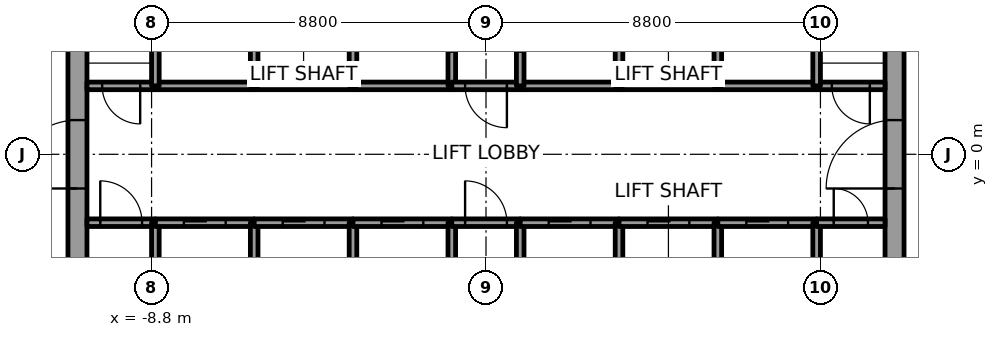
"""IFC4 building model, lengths in metres.
Left out: names, types, materials, properties, quantities, classifications, styles, units other than length and angle.
Written with IfcOpenShell. Run it as: python <this file> out.ifc"""

import sys

from ifc_helpers import new_model, si_unit, direction, frame, frame_2d, origin, place, context, subcontext, project, spatial, rectangle, extrude, element, fill, save


model = new_model("IFC4")
c1 = context("Model", 3, precision=1e-05, world=origin(), true_north=direction((0.0, 1.0)))
c2 = subcontext(c1, "Body", "Model", "MODEL_VIEW")
j1 = project(units=[si_unit("LENGTHUNIT", "METRE"), si_unit("PLANEANGLEUNIT", "RADIAN")], contexts=[c1])
p1 = place(None, origin())
s1 = spatial("IfcSite", under=j1, at=p1, CompositionType="ELEMENT")
p2 = place(p1, origin())
s2 = spatial("IfcBuilding", under=s1, at=p2, CompositionType="ELEMENT")
p3 = place(p2, frame((0.0, 0.0, 185.8)))
s3 = spatial("IfcBuildingStorey", under=s2, at=p3, CompositionType="ELEMENT", Elevation=185.8)
p4 = place(p3, frame((-10.75, -7.5, 0.0), z_axis=(0.0, 0.0, 1.0), x_axis=(0.0, 1.0, 0.0)))
e1 = element("IfcWall", 1, at=p4, inside=s3, PredefinedType="SHEAR", context=c2, shape_type="SweptSolid", body=[
    extrude(rectangle(XDim=15.0, YDim=0.5, at=frame_2d((7.5, 0.0))), origin(), (0.0, 0.0, 1.0), 4.0),
])
p5 = place(p4, frame((6.6, 0.0, 0.0)))
e2 = element("IfcOpeningElement", 2, at=p5, cuts=e1, PredefinedType="OPENING", context=c2, shape_type="SweptSolid", body=[
    extrude(rectangle(XDim=1.8, YDim=2.1, at=frame_2d((0.9, 1.05))), frame((0.0, 0.25, 0.0), z_axis=(0.0, -1.0, 0.0), x_axis=(1.0, 0.0, 0.0)), (0.0, 0.0, 1.0), 0.5),
])
p6 = place(p3, frame((10.75, -7.5, 0.0), z_axis=(0.0, 0.0, 1.0), x_axis=(0.0, 1.0, 0.0)))
e3 = element("IfcWall", 3, at=p6, inside=s3, PredefinedType="SHEAR", context=c2, shape_type="SweptSolid", body=[
    extrude(rectangle(XDim=15.0, YDim=0.5, at=frame_2d((7.5, 0.0))), origin(), (0.0, 0.0, 1.0), 4.0),
])
p7 = place(p6, frame((6.6, 0.0, 0.0)))
e4 = element("IfcOpeningElement", 4, at=p7, cuts=e3, PredefinedType="OPENING", context=c2, shape_type="SweptSolid", body=[
    extrude(rectangle(XDim=1.8, YDim=2.1, at=frame_2d((0.9, 1.05))), frame((0.0, 0.25, 0.0), z_axis=(0.0, -1.0, 0.0), x_axis=(1.0, 0.0, 0.0)), (0.0, 0.0, 1.0), 0.5),
])
p8 = place(p3, frame((-10.5, -1.8, 0.0), z_axis=(0.0, 0.0, 1.0), x_axis=(1.0, 0.0, 0.0)))
e5 = element("IfcWall", 5, at=p8, inside=s3, PredefinedType="SOLIDWALL", context=c2, shape_type="SweptSolid", body=[
    extrude(rectangle(XDim=1.8, YDim=0.2, at=frame_2d((0.9, 0.0))), origin(), (0.0, 0.0, 1.0), 3.85),
])
p9 = place(p8, frame((0.35, 0.0, 0.0)))
e6 = element("IfcOpeningElement", 6, at=p9, cuts=e5, PredefinedType="OPENING", context=c2, shape_type="SweptSolid", body=[
    extrude(rectangle(XDim=1.1, YDim=2.1, at=frame_2d((0.55, 1.05))), frame((0.0, 0.1, 0.0), z_axis=(0.0, -1.0, 0.0), x_axis=(1.0, 0.0, 0.0)), (0.0, 0.0, 1.0), 0.2),
])
p10 = place(p3, frame((-8.7, 1.8, 0.0), z_axis=(0.0, 0.0, 1.0), x_axis=(-1.0, 0.0, 0.0)))
e7 = element("IfcWall", 7, at=p10, inside=s3, PredefinedType="SOLIDWALL", context=c2, shape_type="SweptSolid", body=[
    extrude(rectangle(XDim=1.8, YDim=0.2, at=frame_2d((0.9, 0.0))), origin(), (0.0, 0.0, 1.0), 3.85),
])
p11 = place(p10, frame((0.4, 0.0, 0.0)))
e8 = element("IfcOpeningElement", 8, at=p11, cuts=e7, PredefinedType="OPENING", context=c2, shape_type="SweptSolid", body=[
    extrude(rectangle(XDim=1.0, YDim=2.1, at=frame_2d((0.5, 1.05))), frame((0.0, 0.1, 0.0), z_axis=(0.0, -1.0, 0.0), x_axis=(1.0, 0.0, 0.0)), (0.0, 0.0, 1.0), 0.2),
])
p12 = place(p3, frame((-8.7, -4.6, 0.0), z_axis=(0.0, 0.0, 1.0), x_axis=(0.0, 1.0, 0.0)))
e9 = element("IfcWall", 9, at=p12, inside=s3, PredefinedType="SOLIDWALL", context=c2, shape_type="SweptSolid", body=[
    extrude(rectangle(XDim=2.8, YDim=0.2, at=frame_2d((1.4, 0.0))), origin(), (0.0, 0.0, 1.0), 3.85),
])
p13 = place(p3, frame((-8.7, -1.8, 0.0), z_axis=(0.0, 0.0, 1.0), x_axis=(1.0, 0.0, 0.0)))
e10 = element("IfcWall", 10, at=p13, inside=s3, PredefinedType="SOLIDWALL", context=c2, shape_type="SweptSolid", body=[
    extrude(rectangle(XDim=2.6, YDim=0.2, at=frame_2d((1.3, 0.0))), origin(), (0.0, 0.0, 1.0), 3.85),
])
p14 = place(p13, frame((0.75, 0.0, 0.0)))
e11 = element("IfcOpeningElement", 11, at=p14, cuts=e10, PredefinedType="OPENING", context=c2, shape_type="SweptSolid", body=[
    extrude(rectangle(XDim=1.1, YDim=2.1, at=frame_2d((0.55, 1.05))), frame((0.0, 0.1, 0.0), z_axis=(0.0, -1.0, 0.0), x_axis=(1.0, 0.0, 0.0)), (0.0, 0.0, 1.0), 0.2),
])
p15 = place(p3, frame((-6.1, 1.8, 0.0), z_axis=(0.0, 0.0, 1.0), x_axis=(-1.0, 0.0, 0.0)))
e12 = element("IfcWall", 12, at=p15, inside=s3, PredefinedType="SOLIDWALL", context=c2, shape_type="SweptSolid", body=[
    extrude(rectangle(XDim=2.6, YDim=0.2, at=frame_2d((1.3, 0.0))), origin(), (0.0, 0.0, 1.0), 3.85),
])
for number, where, z_axis, x_axis in (
    (13, (-8.7, 1.8, 0.0), (0.0, 0.0, 1.0), (0.0, 1.0, 0.0)),
    (14, (-6.1, -4.6, 0.0), (0.0, 0.0, 1.0), (0.0, 1.0, 0.0)),
):
    element("IfcWall", number, at=place(p3, frame(where, z_axis=z_axis, x_axis=x_axis)), inside=s3, PredefinedType="SOLIDWALL", context=c2, shape_type="SweptSolid", body=[
        extrude(rectangle(XDim=2.8, YDim=0.2, at=frame_2d((1.4, 0.0))), origin(), (0.0, 0.0, 1.0), 3.85),
    ])
p16 = place(p3, frame((-6.1, -1.8, 0.0), z_axis=(0.0, 0.0, 1.0), x_axis=(1.0, 0.0, 0.0)))
e15 = element("IfcWall", 15, at=p16, inside=s3, PredefinedType="SOLIDWALL", context=c2, shape_type="SweptSolid", body=[
    extrude(rectangle(XDim=2.6, YDim=0.2, at=frame_2d((1.3, 0.0))), origin(), (0.0, 0.0, 1.0), 3.85),
])
p17 = place(p16, frame((0.75, 0.0, 0.0)))
e16 = element("IfcOpeningElement", 16, at=p17, cuts=e15, PredefinedType="OPENING", context=c2, shape_type="SweptSolid", body=[
    extrude(rectangle(XDim=1.1, YDim=2.1, at=frame_2d((0.55, 1.05))), frame((0.0, 0.1, 0.0), z_axis=(0.0, -1.0, 0.0), x_axis=(1.0, 0.0, 0.0)), (0.0, 0.0, 1.0), 0.2),
])
p18 = place(p3, frame((-3.5, 1.8, 0.0), z_axis=(0.0, 0.0, 1.0), x_axis=(-1.0, 0.0, 0.0)))
e17 = element("IfcWall", 17, at=p18, inside=s3, PredefinedType="SOLIDWALL", context=c2, shape_type="SweptSolid", body=[
    extrude(rectangle(XDim=2.6, YDim=0.2, at=frame_2d((1.3, 0.0))), origin(), (0.0, 0.0, 1.0), 3.85),
])
for number, where, z_axis, x_axis in (
    (18, (-6.1, 1.8, 0.0), (0.0, 0.0, 1.0), (0.0, 1.0, 0.0)),
    (19, (-3.5, -4.6, 0.0), (0.0, 0.0, 1.0), (0.0, 1.0, 0.0)),
):
    element("IfcWall", number, at=place(p3, frame(where, z_axis=z_axis, x_axis=x_axis)), inside=s3, PredefinedType="SOLIDWALL", context=c2, shape_type="SweptSolid", body=[
        extrude(rectangle(XDim=2.8, YDim=0.2, at=frame_2d((1.4, 0.0))), origin(), (0.0, 0.0, 1.0), 3.85),
    ])
p19 = place(p3, frame((-3.5, -1.8, 0.0), z_axis=(0.0, 0.0, 1.0), x_axis=(1.0, 0.0, 0.0)))
e20 = element("IfcWall", 20, at=p19, inside=s3, PredefinedType="SOLIDWALL", context=c2, shape_type="SweptSolid", body=[
    extrude(rectangle(XDim=2.6, YDim=0.2, at=frame_2d((1.3, 0.0))), origin(), (0.0, 0.0, 1.0), 3.85),
])
p20 = place(p19, frame((0.75, 0.0, 0.0)))
e21 = element("IfcOpeningElement", 21, at=p20, cuts=e20, PredefinedType="OPENING", context=c2, shape_type="SweptSolid", body=[
    extrude(rectangle(XDim=1.1, YDim=2.1, at=frame_2d((0.55, 1.05))), frame((0.0, 0.1, 0.0), z_axis=(0.0, -1.0, 0.0), x_axis=(1.0, 0.0, 0.0)), (0.0, 0.0, 1.0), 0.2),
])
p21 = place(p3, frame((-0.9, 1.8, 0.0), z_axis=(0.0, 0.0, 1.0), x_axis=(-1.0, 0.0, 0.0)))
e22 = element("IfcWall", 22, at=p21, inside=s3, PredefinedType="SOLIDWALL", context=c2, shape_type="SweptSolid", body=[
    extrude(rectangle(XDim=2.6, YDim=0.2, at=frame_2d((1.3, 0.0))), origin(), (0.0, 0.0, 1.0), 3.85),
])
p22 = place(p3, frame((-3.5, 4.6, 0.0), z_axis=(0.0, 0.0, 1.0), x_axis=(0.0, -1.0, 0.0)))
e23 = element("IfcWall", 23, at=p22, inside=s3, PredefinedType="SOLIDWALL", context=c2, shape_type="SweptSolid", body=[
    extrude(rectangle(XDim=2.8, YDim=0.2, at=frame_2d((1.4, 0.0))), origin(), (0.0, 0.0, 1.0), 3.85),
])
p23 = place(p3, frame((-0.9, 1.8, 0.0), z_axis=(0.0, 0.0, 1.0), x_axis=(0.0, 1.0, 0.0)))
e24 = element("IfcWall", 24, at=p23, inside=s3, PredefinedType="SOLIDWALL", context=c2, shape_type="SweptSolid", body=[
    extrude(rectangle(XDim=3.0, YDim=0.2, at=frame_2d((1.5, 0.0))), origin(), (0.0, 0.0, 1.0), 3.85),
])
p24 = place(p23, frame((0.9, 0.0, 0.0)))
e25 = element("IfcOpeningElement", 25, at=p24, cuts=e24, PredefinedType="OPENING", context=c2, shape_type="SweptSolid", body=[
    extrude(rectangle(XDim=1.2, YDim=2.1, at=frame_2d((0.6, 1.05))), frame((0.0, 0.1, 0.0), z_axis=(0.0, -1.0, 0.0), x_axis=(1.0, 0.0, 0.0)), (0.0, 0.0, 1.0), 0.2),
])
p25 = place(p3, frame((-0.9, -4.6, 0.0), z_axis=(0.0, 0.0, 1.0), x_axis=(0.0, 1.0, 0.0)))
e26 = element("IfcWall", 26, at=p25, inside=s3, PredefinedType="SOLIDWALL", context=c2, shape_type="SweptSolid", body=[
    extrude(rectangle(XDim=2.8, YDim=0.2, at=frame_2d((1.4, 0.0))), origin(), (0.0, 0.0, 1.0), 3.85),
])
p26 = place(p3, frame((-0.9, -1.8, 0.0), z_axis=(0.0, 0.0, 1.0), x_axis=(1.0, 0.0, 0.0)))
e27 = element("IfcWall", 27, at=p26, inside=s3, PredefinedType="SOLIDWALL", context=c2, shape_type="SweptSolid", body=[
    extrude(rectangle(XDim=1.8, YDim=0.2, at=frame_2d((0.9, 0.0))), origin(), (0.0, 0.0, 1.0), 3.85),
])
p27 = place(p26, frame((0.35, 0.0, 0.0)))
e28 = element("IfcOpeningElement", 28, at=p27, cuts=e27, PredefinedType="OPENING", context=c2, shape_type="SweptSolid", body=[
    extrude(rectangle(XDim=1.1, YDim=2.1, at=frame_2d((0.55, 1.05))), frame((0.0, 0.1, 0.0), z_axis=(0.0, -1.0, 0.0), x_axis=(1.0, 0.0, 0.0)), (0.0, 0.0, 1.0), 0.2),
])
p28 = place(p3, frame((0.9, 1.8, 0.0), z_axis=(0.0, 0.0, 1.0), x_axis=(-1.0, 0.0, 0.0)))
e29 = element("IfcWall", 29, at=p28, inside=s3, PredefinedType="SOLIDWALL", context=c2, shape_type="SweptSolid", body=[
    extrude(rectangle(XDim=1.8, YDim=0.2, at=frame_2d((0.9, 0.0))), origin(), (0.0, 0.0, 1.0), 3.85),
])
p29 = place(p28, frame((0.35, 0.0, 0.0)))
e30 = element("IfcOpeningElement", 30, at=p29, cuts=e29, PredefinedType="OPENING", context=c2, shape_type="SweptSolid", body=[
    extrude(rectangle(XDim=1.1, YDim=2.1, at=frame_2d((0.55, 1.05))), frame((0.0, 0.1, 0.0), z_axis=(0.0, -1.0, 0.0), x_axis=(1.0, 0.0, 0.0)), (0.0, 0.0, 1.0), 0.2),
])
p30 = place(p3, frame((0.9, -1.8, 0.0), z_axis=(0.0, 0.0, 1.0), x_axis=(0.0, -1.0, 0.0)))
e31 = element("IfcWall", 31, at=p30, inside=s3, PredefinedType="SOLIDWALL", context=c2, shape_type="SweptSolid", body=[
    extrude(rectangle(XDim=2.8, YDim=0.2, at=frame_2d((1.4, 0.0))), origin(), (0.0, 0.0, 1.0), 3.85),
])
p31 = place(p3, frame((0.9, -1.8, 0.0), z_axis=(0.0, 0.0, 1.0), x_axis=(1.0, 0.0, 0.0)))
e32 = element("IfcWall", 32, at=p31, inside=s3, PredefinedType="SOLIDWALL", context=c2, shape_type="SweptSolid", body=[
    extrude(rectangle(XDim=2.6, YDim=0.2, at=frame_2d((1.3, 0.0))), origin(), (0.0, 0.0, 1.0), 3.85),
])
p32 = place(p31, frame((0.75, 0.0, 0.0)))
e33 = element("IfcOpeningElement", 33, at=p32, cuts=e32, PredefinedType="OPENING", context=c2, shape_type="SweptSolid", body=[
    extrude(rectangle(XDim=1.1, YDim=2.1, at=frame_2d((0.55, 1.05))), frame((0.0, 0.1, 0.0), z_axis=(0.0, -1.0, 0.0), x_axis=(1.0, 0.0, 0.0)), (0.0, 0.0, 1.0), 0.2),
])
p33 = place(p3, frame((3.5, 1.8, 0.0), z_axis=(0.0, 0.0, 1.0), x_axis=(-1.0, 0.0, 0.0)))
e34 = element("IfcWall", 34, at=p33, inside=s3, PredefinedType="SOLIDWALL", context=c2, shape_type="SweptSolid", body=[
    extrude(rectangle(XDim=2.6, YDim=0.2, at=frame_2d((1.3, 0.0))), origin(), (0.0, 0.0, 1.0), 3.85),
])
p34 = place(p3, frame((0.9, 4.8, 0.0), z_axis=(0.0, 0.0, 1.0), x_axis=(0.0, -1.0, 0.0)))
e35 = element("IfcWall", 35, at=p34, inside=s3, PredefinedType="SOLIDWALL", context=c2, shape_type="SweptSolid", body=[
    extrude(rectangle(XDim=3.0, YDim=0.2, at=frame_2d((1.5, 0.0))), origin(), (0.0, 0.0, 1.0), 3.85),
])
p35 = place(p34, frame((0.9, 0.0, 0.0)))
e36 = element("IfcOpeningElement", 36, at=p35, cuts=e35, PredefinedType="OPENING", context=c2, shape_type="SweptSolid", body=[
    extrude(rectangle(XDim=1.2, YDim=2.1, at=frame_2d((0.6, 1.05))), frame((0.0, 0.1, 0.0), z_axis=(0.0, -1.0, 0.0), x_axis=(1.0, 0.0, 0.0)), (0.0, 0.0, 1.0), 0.2),
])
p36 = place(p3, frame((3.5, -4.6, 0.0), z_axis=(0.0, 0.0, 1.0), x_axis=(0.0, 1.0, 0.0)))
e37 = element("IfcWall", 37, at=p36, inside=s3, PredefinedType="SOLIDWALL", context=c2, shape_type="SweptSolid", body=[
    extrude(rectangle(XDim=2.8, YDim=0.2, at=frame_2d((1.4, 0.0))), origin(), (0.0, 0.0, 1.0), 3.85),
])
p37 = place(p3, frame((3.5, -1.8, 0.0), z_axis=(0.0, 0.0, 1.0), x_axis=(1.0, 0.0, 0.0)))
e38 = element("IfcWall", 38, at=p37, inside=s3, PredefinedType="SOLIDWALL", context=c2, shape_type="SweptSolid", body=[
    extrude(rectangle(XDim=2.6, YDim=0.2, at=frame_2d((1.3, 0.0))), origin(), (0.0, 0.0, 1.0), 3.85),
])
p38 = place(p37, frame((0.75, 0.0, 0.0)))
e39 = element("IfcOpeningElement", 39, at=p38, cuts=e38, PredefinedType="OPENING", context=c2, shape_type="SweptSolid", body=[
    extrude(rectangle(XDim=1.1, YDim=2.1, at=frame_2d((0.55, 1.05))), frame((0.0, 0.1, 0.0), z_axis=(0.0, -1.0, 0.0), x_axis=(1.0, 0.0, 0.0)), (0.0, 0.0, 1.0), 0.2),
])
p39 = place(p3, frame((6.1, 1.8, 0.0), z_axis=(0.0, 0.0, 1.0), x_axis=(-1.0, 0.0, 0.0)))
e40 = element("IfcWall", 40, at=p39, inside=s3, PredefinedType="SOLIDWALL", context=c2, shape_type="SweptSolid", body=[
    extrude(rectangle(XDim=2.6, YDim=0.2, at=frame_2d((1.3, 0.0))), origin(), (0.0, 0.0, 1.0), 3.85),
])
for number, where, z_axis, x_axis in (
    (41, (3.5, 1.8, 0.0), (0.0, 0.0, 1.0), (0.0, 1.0, 0.0)),
    (42, (6.1, -4.6, 0.0), (0.0, 0.0, 1.0), (0.0, 1.0, 0.0)),
):
    element("IfcWall", number, at=place(p3, frame(where, z_axis=z_axis, x_axis=x_axis)), inside=s3, PredefinedType="SOLIDWALL", context=c2, shape_type="SweptSolid", body=[
        extrude(rectangle(XDim=2.8, YDim=0.2, at=frame_2d((1.4, 0.0))), origin(), (0.0, 0.0, 1.0), 3.85),
    ])
p40 = place(p3, frame((6.1, -1.8, 0.0), z_axis=(0.0, 0.0, 1.0), x_axis=(1.0, 0.0, 0.0)))
e43 = element("IfcWall", 43, at=p40, inside=s3, PredefinedType="SOLIDWALL", context=c2, shape_type="SweptSolid", body=[
    extrude(rectangle(XDim=2.6, YDim=0.2, at=frame_2d((1.3, 0.0))), origin(), (0.0, 0.0, 1.0), 3.85),
])
p41 = place(p40, frame((0.75, 0.0, 0.0)))
e44 = element("IfcOpeningElement", 44, at=p41, cuts=e43, PredefinedType="OPENING", context=c2, shape_type="SweptSolid", body=[
    extrude(rectangle(XDim=1.1, YDim=2.1, at=frame_2d((0.55, 1.05))), frame((0.0, 0.1, 0.0), z_axis=(0.0, -1.0, 0.0), x_axis=(1.0, 0.0, 0.0)), (0.0, 0.0, 1.0), 0.2),
])
p42 = place(p3, frame((8.7, 1.8, 0.0), z_axis=(0.0, 0.0, 1.0), x_axis=(-1.0, 0.0, 0.0)))
e45 = element("IfcWall", 45, at=p42, inside=s3, PredefinedType="SOLIDWALL", context=c2, shape_type="SweptSolid", body=[
    extrude(rectangle(XDim=2.6, YDim=0.2, at=frame_2d((1.3, 0.0))), origin(), (0.0, 0.0, 1.0), 3.85),
])
for number, where, z_axis, x_axis in (
    (46, (6.1, 1.8, 0.0), (0.0, 0.0, 1.0), (0.0, 1.0, 0.0)),
    (47, (8.7, -1.8, 0.0), (0.0, 0.0, 1.0), (0.0, -1.0, 0.0)),
):
    element("IfcWall", number, at=place(p3, frame(where, z_axis=z_axis, x_axis=x_axis)), inside=s3, PredefinedType="SOLIDWALL", context=c2, shape_type="SweptSolid", body=[
        extrude(rectangle(XDim=2.8, YDim=0.2, at=frame_2d((1.4, 0.0))), origin(), (0.0, 0.0, 1.0), 3.85),
    ])
p43 = place(p3, frame((8.7, -1.8, 0.0), z_axis=(0.0, 0.0, 1.0), x_axis=(1.0, 0.0, 0.0)))
e48 = element("IfcWall", 48, at=p43, inside=s3, PredefinedType="SOLIDWALL", context=c2, shape_type="SweptSolid", body=[
    extrude(rectangle(XDim=1.8, YDim=0.2, at=frame_2d((0.9, 0.0))), origin(), (0.0, 0.0, 1.0), 3.85),
])
p44 = place(p43, frame((0.45, 0.0, 0.0)))
e49 = element("IfcOpeningElement", 49, at=p44, cuts=e48, PredefinedType="OPENING", context=c2, shape_type="SweptSolid", body=[
    extrude(rectangle(XDim=0.9, YDim=2.1, at=frame_2d((0.45, 1.05))), frame((0.0, 0.1, 0.0), z_axis=(0.0, -1.0, 0.0), x_axis=(1.0, 0.0, 0.0)), (0.0, 0.0, 1.0), 0.2),
])
p45 = place(p3, frame((10.5, 1.8, 0.0), z_axis=(0.0, 0.0, 1.0), x_axis=(-1.0, 0.0, 0.0)))
e50 = element("IfcWall", 50, at=p45, inside=s3, PredefinedType="SOLIDWALL", context=c2, shape_type="SweptSolid", body=[
    extrude(rectangle(XDim=1.8, YDim=0.2, at=frame_2d((0.9, 0.0))), origin(), (0.0, 0.0, 1.0), 3.85),
])
p46 = place(p45, frame((0.4, 0.0, 0.0)))
e51 = element("IfcOpeningElement", 51, at=p46, cuts=e50, PredefinedType="OPENING", context=c2, shape_type="SweptSolid", body=[
    extrude(rectangle(XDim=1.0, YDim=2.1, at=frame_2d((0.5, 1.05))), frame((0.0, 0.1, 0.0), z_axis=(0.0, -1.0, 0.0), x_axis=(1.0, 0.0, 0.0)), (0.0, 0.0, 1.0), 0.2),
])
p47 = place(p3, frame((8.7, 4.6, 0.0), z_axis=(0.0, 0.0, 1.0), x_axis=(0.0, -1.0, 0.0)))
e52 = element("IfcWall", 52, at=p47, inside=s3, PredefinedType="SOLIDWALL", context=c2, shape_type="SweptSolid", body=[
    extrude(rectangle(XDim=2.8, YDim=0.2, at=frame_2d((1.4, 0.0))), origin(), (0.0, 0.0, 1.0), 3.85),
])
p48 = place(p14, origin())
e53 = element("IfcDoor", 53, at=p48, inside=s3, OperationType="SLIDING_TO_RIGHT", PredefinedType="DOOR", context=c2, shape_type="SweptSolid", body=[
    extrude(rectangle(XDim=1.1, YDim=2.1, at=frame_2d((0.55, 1.05))), frame((0.0, 0.025, 0.0), z_axis=(0.0, -1.0, 0.0), x_axis=(1.0, 0.0, 0.0)), (0.0, 0.0, 1.0), 0.05),
])
fill(e11, e53)
p49 = place(p17, origin())
e54 = element("IfcDoor", 54, at=p49, inside=s3, OperationType="SLIDING_TO_RIGHT", PredefinedType="DOOR", context=c2, shape_type="SweptSolid", body=[
    extrude(rectangle(XDim=1.1, YDim=2.1, at=frame_2d((0.55, 1.05))), frame((0.0, 0.025, 0.0), z_axis=(0.0, -1.0, 0.0), x_axis=(1.0, 0.0, 0.0)), (0.0, 0.0, 1.0), 0.05),
])
fill(e16, e54)
p50 = place(p20, origin())
e55 = element("IfcDoor", 55, at=p50, inside=s3, OperationType="SLIDING_TO_RIGHT", PredefinedType="DOOR", context=c2, shape_type="SweptSolid", body=[
    extrude(rectangle(XDim=1.1, YDim=2.1, at=frame_2d((0.55, 1.05))), frame((0.0, 0.025, 0.0), z_axis=(0.0, -1.0, 0.0), x_axis=(1.0, 0.0, 0.0)), (0.0, 0.0, 1.0), 0.05),
])
fill(e21, e55)
p51 = place(p32, origin())
e56 = element("IfcDoor", 56, at=p51, inside=s3, OperationType="SLIDING_TO_RIGHT", PredefinedType="DOOR", context=c2, shape_type="SweptSolid", body=[
    extrude(rectangle(XDim=1.1, YDim=2.1, at=frame_2d((0.55, 1.05))), frame((0.0, 0.025, 0.0), z_axis=(0.0, -1.0, 0.0), x_axis=(1.0, 0.0, 0.0)), (0.0, 0.0, 1.0), 0.05),
])
fill(e33, e56)
p52 = place(p38, origin())
e57 = element("IfcDoor", 57, at=p52, inside=s3, OperationType="SLIDING_TO_LEFT", PredefinedType="DOOR", context=c2, shape_type="SweptSolid", body=[
    extrude(rectangle(XDim=1.1, YDim=2.1, at=frame_2d((0.55, 1.05))), frame((0.0, 0.025, 0.0), z_axis=(0.0, -1.0, 0.0), x_axis=(1.0, 0.0, 0.0)), (0.0, 0.0, 1.0), 0.05),
])
fill(e39, e57)
p53 = place(p41, origin())
e58 = element("IfcDoor", 58, at=p53, inside=s3, OperationType="SLIDING_TO_RIGHT", PredefinedType="DOOR", context=c2, shape_type="SweptSolid", body=[
    extrude(rectangle(XDim=1.1, YDim=2.1, at=frame_2d((0.55, 1.05))), frame((0.0, 0.025, 0.0), z_axis=(0.0, -1.0, 0.0), x_axis=(1.0, 0.0, 0.0)), (0.0, 0.0, 1.0), 0.05),
])
fill(e44, e58)
p54 = place(p9, origin())
e59 = element("IfcDoor", 59, at=p54, inside=s3, OperationType="SINGLE_SWING_LEFT", PredefinedType="DOOR", context=c2, shape_type="SweptSolid", body=[
    extrude(rectangle(XDim=1.1, YDim=2.1, at=frame_2d((0.55, 1.05))), frame((0.0, 0.025, 0.0), z_axis=(0.0, -1.0, 0.0), x_axis=(1.0, 0.0, 0.0)), (0.0, 0.0, 1.0), 0.05),
])
fill(e6, e59)
p55 = place(p29, origin())
e60 = element("IfcDoor", 60, at=p55, inside=s3, OperationType="SINGLE_SWING_RIGHT", PredefinedType="DOOR", context=c2, shape_type="SweptSolid", body=[
    extrude(rectangle(XDim=1.1, YDim=2.1, at=frame_2d((0.55, 1.05))), frame((0.0, 0.025, 0.0), z_axis=(0.0, -1.0, 0.0), x_axis=(1.0, 0.0, 0.0)), (0.0, 0.0, 1.0), 0.05),
])
fill(e30, e60)
p56 = place(p27, origin())
e61 = element("IfcDoor", 61, at=p56, inside=s3, OperationType="SINGLE_SWING_LEFT", PredefinedType="DOOR", context=c2, shape_type="SweptSolid", body=[
    extrude(rectangle(XDim=1.1, YDim=2.1, at=frame_2d((0.55, 1.05))), frame((0.0, 0.025, 0.0), z_axis=(0.0, -1.0, 0.0), x_axis=(1.0, 0.0, 0.0)), (0.0, 0.0, 1.0), 0.05),
])
fill(e28, e61)
p57 = place(p11, origin())
e62 = element("IfcDoor", 62, at=p57, inside=s3, OperationType="SINGLE_SWING_RIGHT", PredefinedType="DOOR", context=c2, shape_type="SweptSolid", body=[
    extrude(rectangle(XDim=1.0, YDim=2.1, at=frame_2d((0.5, 1.05))), frame((0.0, 0.025, 0.0), z_axis=(0.0, -1.0, 0.0), x_axis=(1.0, 0.0, 0.0)), (0.0, 0.0, 1.0), 0.05),
])
fill(e8, e62)
p58 = place(p46, origin())
e63 = element("IfcDoor", 63, at=p58, inside=s3, OperationType="SINGLE_SWING_LEFT", PredefinedType="DOOR", context=c2, shape_type="SweptSolid", body=[
    extrude(rectangle(XDim=1.0, YDim=2.1, at=frame_2d((0.5, 1.05))), frame((0.0, 0.025, 0.0), z_axis=(0.0, -1.0, 0.0), x_axis=(1.0, 0.0, 0.0)), (0.0, 0.0, 1.0), 0.05),
])
fill(e51, e63)
p59 = place(p44, origin())
e64 = element("IfcDoor", 64, at=p59, inside=s3, OperationType="SINGLE_SWING_LEFT", PredefinedType="DOOR", context=c2, shape_type="SweptSolid", body=[
    extrude(rectangle(XDim=0.9, YDim=2.1, at=frame_2d((0.45, 1.05))), frame((0.0, 0.025, 0.0), z_axis=(0.0, -1.0, 0.0), x_axis=(1.0, 0.0, 0.0)), (0.0, 0.0, 1.0), 0.05),
])
fill(e49, e64)
p60 = place(p5, origin())
e65 = element("IfcDoor", 65, at=p60, inside=s3, OperationType="DOUBLE_DOOR_SINGLE_SWING", PredefinedType="DOOR", context=c2, shape_type="SweptSolid", body=[
    extrude(rectangle(XDim=1.8, YDim=2.1, at=frame_2d((0.9, 1.05))), frame((0.0, 0.025, 0.0), z_axis=(0.0, -1.0, 0.0), x_axis=(1.0, 0.0, 0.0)), (0.0, 0.0, 1.0), 0.05),
])
fill(e2, e65)
p61 = place(p7, origin())
e66 = element("IfcDoor", 66, at=p61, inside=s3, OperationType="DOUBLE_DOOR_SINGLE_SWING", PredefinedType="DOOR", context=c2, shape_type="SweptSolid", body=[
    extrude(rectangle(XDim=1.8, YDim=2.1, at=frame_2d((0.9, 1.05))), frame((0.0, 0.025, 0.0), z_axis=(0.0, -1.0, 0.0), x_axis=(1.0, 0.0, 0.0)), (0.0, 0.0, 1.0), 0.05),
])
fill(e4, e66)
save(model, sys.argv[1])
